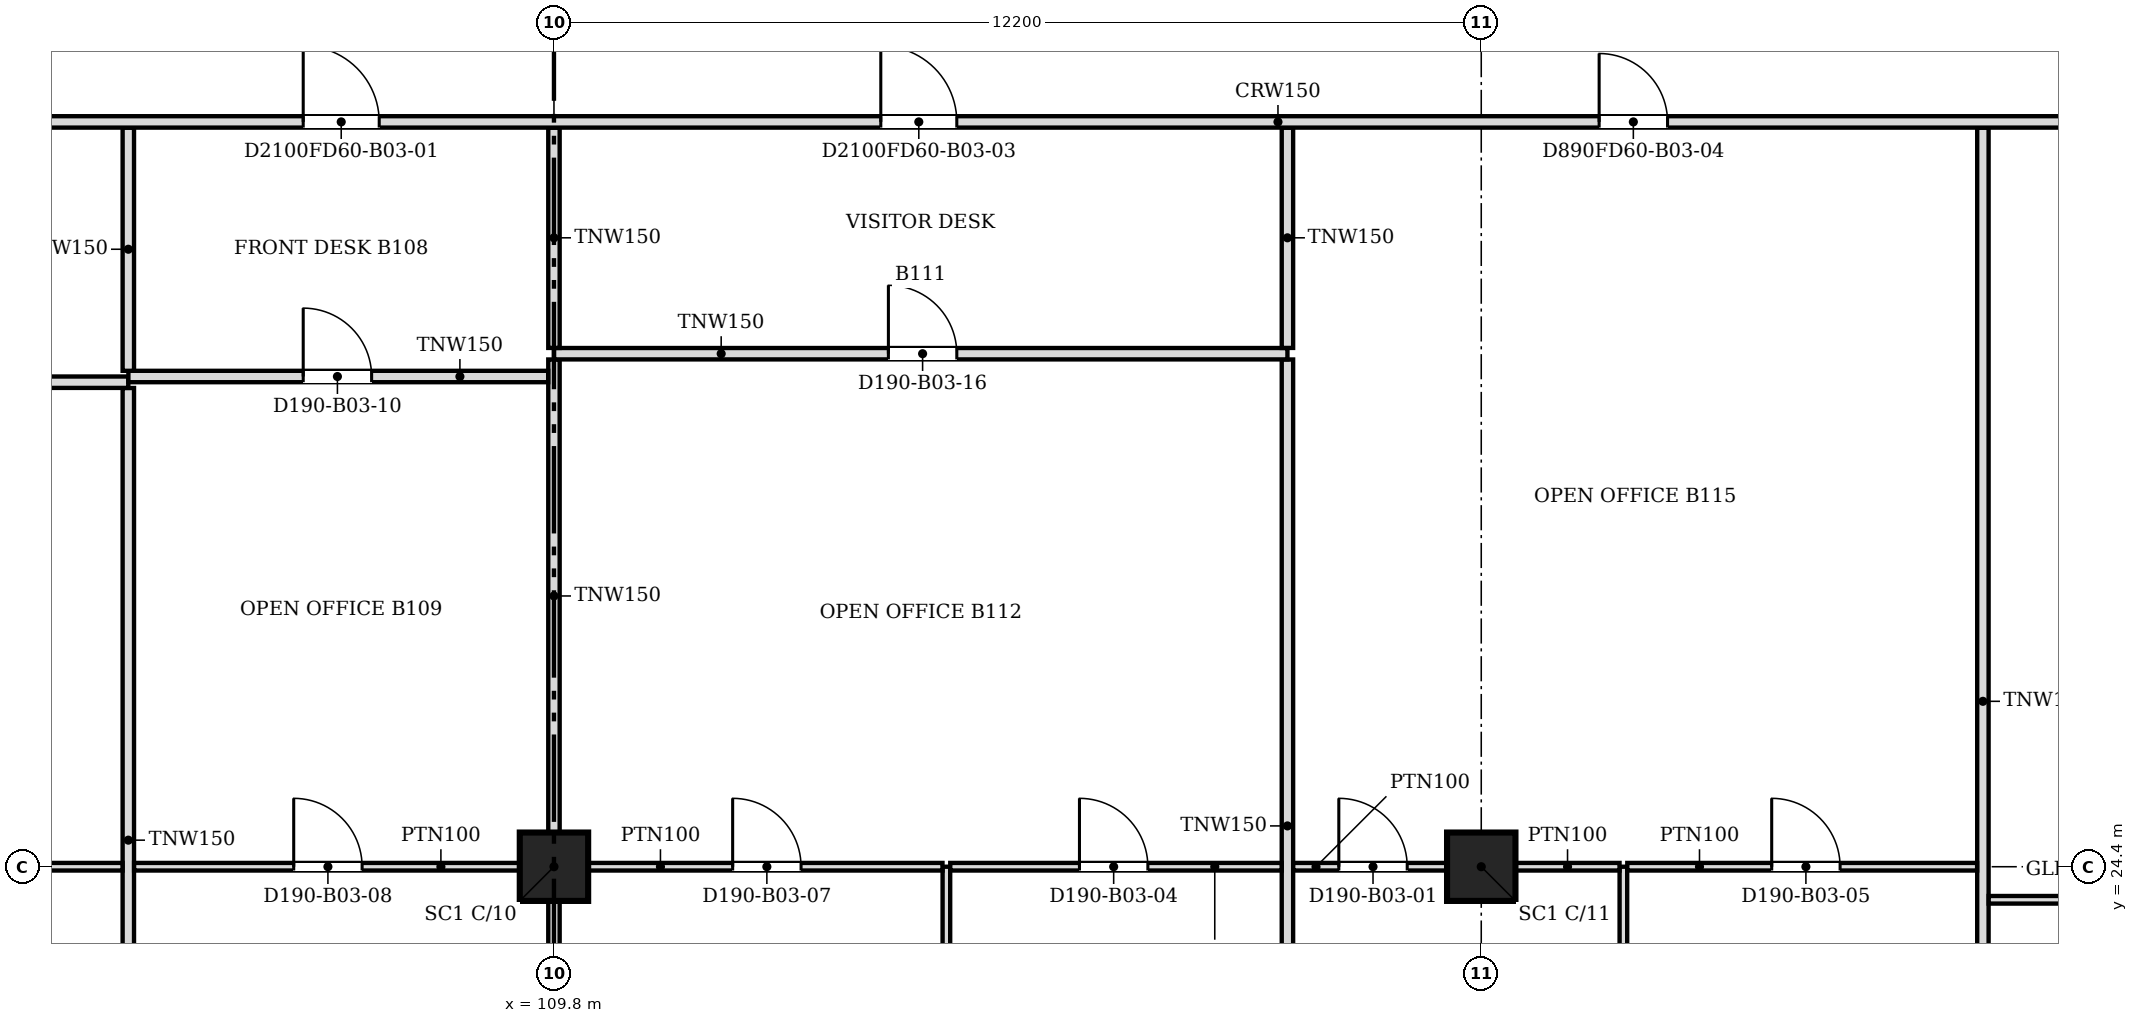
"""IFC4 building model, lengths in metres.
Left out: names, types, materials, properties, quantities, classifications, styles, units other than length and angle.
Written with IfcOpenShell. Run it as: python <this file> out.ifc"""

import sys

from ifc_helpers import new_model, si_unit, direction, frame, frame_2d, origin, origin_2d, place, context, subcontext, project, spatial, rectangle, extrude, source, transform, mapped, element, fill, save


model = new_model("IFC4")
c1 = context("Model", 3, precision=1e-05, world=origin(), true_north=direction((0.0, 1.0)))
c2 = subcontext(c1, "Body", "Model", "MODEL_VIEW")
j1 = project(units=[si_unit("LENGTHUNIT", "METRE"), si_unit("PLANEANGLEUNIT", "RADIAN")], contexts=[c1])
p1 = place(None, origin())
s1 = spatial("IfcSite", under=j1, at=p1, CompositionType="ELEMENT")
p2 = place(p1, origin())
s2 = spatial("IfcBuilding", under=s1, at=p2, CompositionType="ELEMENT")
p3 = place(p2, frame((0.0, 0.0, 25.8)))
s3 = spatial("IfcBuildingStorey", under=s2, at=p3, CompositionType="ELEMENT", Elevation=25.8)
for number, where, z_axis, x_axis in (
    (1, (109.8, 24.4, 0.0), (0.0, 0.0, 1.0), (1.0, 0.0, 0.0)),
    (2, (122.0, 24.4, 0.0), (0.0, 0.0, 1.0), (1.0, 0.0, 0.0)),
):
    element("IfcColumn", number, at=place(p3, frame(where, z_axis=z_axis, x_axis=x_axis)), inside=s3, PredefinedType="COLUMN", context=c2, shape_type="SweptSolid", body=[
        extrude(rectangle(XDim=0.9, YDim=0.9, at=origin_2d()), origin(), (0.0, 0.0, 1.0), 3.6),
    ])
p4 = place(p3, frame((104.2, 18.8, 0.0), z_axis=(0.0, 0.0, 1.0), x_axis=(0.0, 1.0, 0.0)))
e3 = element("IfcWall", 3, at=p4, inside=s3, PredefinedType="PARTITIONING", context=c2, shape_type="SweptSolid", body=[
    extrude(rectangle(XDim=11.899, YDim=0.15, at=frame_2d((5.949, 0.0))), origin(), (0.0, 0.0, 1.0), 3.067),
])
p5 = place(p3, frame((109.8, 18.8, 0.0), z_axis=(0.0, 0.0, 1.0), x_axis=(0.0, 1.0, 0.0)))
e4 = element("IfcWall", 4, at=p5, inside=s3, PredefinedType="PARTITIONING", context=c2, shape_type="SweptSolid", body=[
    extrude(rectangle(XDim=5.149, YDim=0.15, at=frame_2d((2.574, 0.0))), origin(), (0.0, 0.0, 1.0), 3.067),
])
p6 = place(p3, frame((114.963, 18.8, 0.0), z_axis=(0.0, 0.0, 1.0), x_axis=(0.0, 1.0, 0.0)))
e5 = element("IfcWall", 5, at=p6, inside=s3, PredefinedType="PARTITIONING", context=c2, shape_type="SweptSolid", body=[
    extrude(rectangle(XDim=5.6, YDim=0.1, at=frame_2d((2.8, 0.0))), origin(), (0.0, 0.0, 1.0), 3.067),
])
p7 = place(p3, frame((119.45, 18.8, 0.0), z_axis=(0.0, 0.0, 1.0), x_axis=(0.0, 1.0, 0.0)))
e6 = element("IfcWall", 6, at=p7, inside=s3, PredefinedType="PARTITIONING", context=c2, shape_type="SweptSolid", body=[
    extrude(rectangle(XDim=12.274, YDim=0.15, at=frame_2d((6.137, 0.0))), origin(), (0.0, 0.0, 1.0), 3.067),
])
p8 = place(p3, frame((123.87, 18.8, 0.0), z_axis=(0.0, 0.0, 1.0), x_axis=(0.0, 1.0, 0.0)))
e7 = element("IfcWall", 7, at=p8, inside=s3, PredefinedType="PARTITIONING", context=c2, shape_type="SweptSolid", body=[
    extrude(rectangle(XDim=5.6, YDim=0.1, at=frame_2d((2.8, 0.0))), origin(), (0.0, 0.0, 1.0), 3.067),
])
p9 = place(p3, frame((128.6, 19.029, 0.0), z_axis=(0.0, 0.0, 1.0), x_axis=(0.0, 1.0, 0.0)))
e8 = element("IfcWall", 8, at=p9, inside=s3, PredefinedType="PARTITIONING", context=c2, shape_type="SweptSolid", body=[
    extrude(rectangle(XDim=15.095, YDim=0.15, at=frame_2d((7.548, 0.0))), origin(), (0.0, 0.0, 1.0), 3.067),
])
p10 = place(p3, frame((133.496, 23.965, 0.0), z_axis=(0.0, 0.0, 1.0), x_axis=(-1.0, 0.0, 0.0)))
e9 = element("IfcWall", 9, at=p10, inside=s3, PredefinedType="PARTITIONING", context=c2, shape_type="SweptSolid", body=[
    extrude(rectangle(XDim=4.82, YDim=0.1, at=frame_2d((2.41, 0.0))), origin(), (0.0, 0.0, 1.0), 3.067),
])
m1 = source(origin(), c2, "Body", "SweptSolid", [
    extrude(rectangle(XDim=0.9, YDim=2.1, at=frame_2d((0.45, 1.05))), frame((0.0, 0.06, 0.0), z_axis=(0.0, -1.0, 0.0), x_axis=(1.0, 0.0, 0.0)), (0.0, 0.0, 1.0), 0.12),
])
p11 = place(p10, frame((1.92, 0.0, 0.0)))
e10 = element("IfcOpeningElement", 10, at=p11, cuts=e9, PredefinedType="OPENING", context=c2, shape_type="MappedRepresentation", body=[
    mapped(m1, transform((0.0, 0.0, 0.0), scale=1.0)),
])
p12 = place(p3, frame((104.124, 24.4, 0.0), z_axis=(0.0, 0.0, 1.0), x_axis=(-1.0, 0.0, 0.0)))
e11 = element("IfcWall", 11, at=p12, inside=s3, PredefinedType="PARTITIONING", context=c2, shape_type="SweptSolid", body=[
    extrude(rectangle(XDim=6.073, YDim=0.1, at=frame_2d((3.037, 0.0))), origin(), (0.0, 0.0, 1.0), 3.067),
])
p13 = place(p12, frame((2.396, 0.0, 0.0)))
e12 = element("IfcOpeningElement", 12, at=p13, cuts=e11, PredefinedType="OPENING", context=c2, shape_type="MappedRepresentation", body=[
    mapped(m1, transform((0.0, 0.0, 0.0), scale=1.0)),
])
p14 = place(p3, frame((109.349, 24.4, 0.0), z_axis=(0.0, 0.0, 1.0), x_axis=(-1.0, 0.0, 0.0)))
e13 = element("IfcWall", 13, at=p14, inside=s3, PredefinedType="PARTITIONING", context=c2, shape_type="SweptSolid", body=[
    extrude(rectangle(XDim=5.073, YDim=0.1, at=frame_2d((2.537, 0.0))), origin(), (0.0, 0.0, 1.0), 3.067),
])
p15 = place(p14, frame((2.073, 0.0, 0.0)))
e14 = element("IfcOpeningElement", 14, at=p15, cuts=e13, PredefinedType="OPENING", context=c2, shape_type="MappedRepresentation", body=[
    mapped(m1, transform((0.0, 0.0, 0.0), scale=1.0)),
])
p16 = place(p3, frame((114.912, 24.4, 0.0), z_axis=(0.0, 0.0, 1.0), x_axis=(-1.0, 0.0, 0.0)))
e15 = element("IfcWall", 15, at=p16, inside=s3, PredefinedType="PARTITIONING", context=c2, shape_type="SweptSolid", body=[
    extrude(rectangle(XDim=4.661, YDim=0.1, at=frame_2d((2.33, 0.0))), origin(), (0.0, 0.0, 1.0), 3.067),
])
p17 = place(p16, frame((1.861, 0.0, 0.0)))
e16 = element("IfcOpeningElement", 16, at=p17, cuts=e15, PredefinedType="OPENING", context=c2, shape_type="MappedRepresentation", body=[
    mapped(m1, transform((0.0, 0.0, 0.0), scale=1.0)),
])
p18 = place(p3, frame((119.374, 24.4, 0.0), z_axis=(0.0, 0.0, 1.0), x_axis=(-1.0, 0.0, 0.0)))
e17 = element("IfcWall", 17, at=p18, inside=s3, PredefinedType="PARTITIONING", context=c2, shape_type="SweptSolid", body=[
    extrude(rectangle(XDim=4.36, YDim=0.1, at=frame_2d((2.18, 0.0))), origin(), (0.0, 0.0, 1.0), 3.067),
])
p19 = place(p18, frame((1.76, 0.0, 0.0)))
e18 = element("IfcOpeningElement", 18, at=p19, cuts=e17, PredefinedType="OPENING", context=c2, shape_type="MappedRepresentation", body=[
    mapped(m1, transform((0.0, 0.0, 0.0), scale=1.0)),
])
p20 = place(p3, frame((121.549, 24.4, 0.0), z_axis=(0.0, 0.0, 1.0), x_axis=(-1.0, 0.0, 0.0)))
e19 = element("IfcWall", 19, at=p20, inside=s3, PredefinedType="PARTITIONING", context=c2, shape_type="SweptSolid", body=[
    extrude(rectangle(XDim=2.023, YDim=0.1, at=frame_2d((1.012, 0.0))), origin(), (0.0, 0.0, 1.0), 3.067),
])
p21 = place(p20, frame((0.523, 0.0, 0.0)))
e20 = element("IfcOpeningElement", 20, at=p21, cuts=e19, PredefinedType="OPENING", context=c2, shape_type="MappedRepresentation", body=[
    mapped(m1, transform((0.0, 0.0, 0.0), scale=1.0)),
])
p22 = place(p3, frame((122.451, 24.4, 0.0), z_axis=(0.0, 0.0, 1.0), x_axis=(1.0, 0.0, 0.0)))
e21 = element("IfcWall", 21, at=p22, inside=s3, PredefinedType="PARTITIONING", context=c2, shape_type="SweptSolid", body=[
    extrude(rectangle(XDim=1.368, YDim=0.1, at=frame_2d((0.684, 0.0))), origin(), (0.0, 0.0, 1.0), 3.067),
])
p23 = place(p3, frame((128.524, 24.4, 0.0), z_axis=(0.0, 0.0, 1.0), x_axis=(-1.0, 0.0, 0.0)))
e22 = element("IfcWall", 22, at=p23, inside=s3, PredefinedType="PARTITIONING", context=c2, shape_type="SweptSolid", body=[
    extrude(rectangle(XDim=4.603, YDim=0.1, at=frame_2d((2.301, 0.0))), origin(), (0.0, 0.0, 1.0), 3.067),
])
p24 = place(p23, frame((1.803, 0.0, 0.0)))
e23 = element("IfcOpeningElement", 23, at=p24, cuts=e22, PredefinedType="OPENING", context=c2, shape_type="MappedRepresentation", body=[
    mapped(m1, transform((0.0, 0.0, 0.0), scale=1.0)),
])
p25 = place(p3, frame((109.8, 24.851, 0.0), z_axis=(0.0, 0.0, 1.0), x_axis=(0.0, 1.0, 0.0)))
e24 = element("IfcWall", 24, at=p25, inside=s3, PredefinedType="PARTITIONING", context=c2, shape_type="SweptSolid", body=[
    extrude(rectangle(XDim=6.223, YDim=0.15, at=frame_2d((3.111, 0.0))), origin(), (0.0, 0.0, 1.0), 3.067),
])
p26 = place(p3, frame((104.2, 30.775, 0.0), z_axis=(0.0, 0.0, 1.0), x_axis=(-1.0, 0.0, 0.0)))
e25 = element("IfcWall", 25, at=p26, inside=s3, PredefinedType="PARTITIONING", context=c2, shape_type="SweptSolid", body=[
    extrude(rectangle(XDim=12.2, YDim=0.15, at=frame_2d((6.1, 0.0))), origin(), (0.0, 0.0, 1.0), 3.067),
])
m2 = source(origin(), c2, "Body", "SweptSolid", [
    extrude(rectangle(XDim=0.9, YDim=2.1, at=frame_2d((0.45, 1.05))), frame((0.0, 0.085, 0.0), z_axis=(0.0, -1.0, 0.0), x_axis=(1.0, 0.0, 0.0)), (0.0, 0.0, 1.0), 0.17),
])
p27 = place(p26, frame((5.7, 0.0, 0.0)))
e26 = element("IfcOpeningElement", 26, at=p27, cuts=e25, PredefinedType="OPENING", context=c2, shape_type="MappedRepresentation", body=[
    mapped(m2, transform((0.0, 0.0, 0.0), scale=1.0)),
])
p28 = place(p3, frame((109.724, 30.85, 0.0), z_axis=(0.0, 0.0, 1.0), x_axis=(-1.0, 0.0, 0.0)))
e27 = element("IfcWall", 27, at=p28, inside=s3, PredefinedType="PARTITIONING", context=c2, shape_type="SweptSolid", body=[
    extrude(rectangle(XDim=5.523, YDim=0.15, at=frame_2d((2.762, 0.0))), origin(), (0.0, 0.0, 1.0), 3.067),
])
p29 = place(p28, frame((2.323, 0.0, 0.0)))
e28 = element("IfcOpeningElement", 28, at=p29, cuts=e27, PredefinedType="OPENING", context=c2, shape_type="MappedRepresentation", body=[
    mapped(m2, transform((0.0, 0.0, 0.0), scale=1.0)),
])
p30 = place(p3, frame((104.2, 30.925, 0.0), z_axis=(0.0, 0.0, 1.0), x_axis=(0.0, 1.0, 0.0)))
e29 = element("IfcWall", 29, at=p30, inside=s3, PredefinedType="PARTITIONING", context=c2, shape_type="SweptSolid", body=[
    extrude(rectangle(XDim=3.199, YDim=0.15, at=frame_2d((1.6, 0.0))), origin(), (0.0, 0.0, 1.0), 3.067),
])
p31 = place(p3, frame((119.45, 31.15, 0.0), z_axis=(0.0, 0.0, 1.0), x_axis=(-1.0, 0.0, 0.0)))
e30 = element("IfcWall", 30, at=p31, inside=s3, PredefinedType="PARTITIONING", context=c2, shape_type="SweptSolid", body=[
    extrude(rectangle(XDim=9.65, YDim=0.15, at=frame_2d((4.825, 0.0))), origin(), (0.0, 0.0, 1.0), 3.067),
])
p32 = place(p31, frame((4.35, 0.0, 0.0)))
e31 = element("IfcOpeningElement", 31, at=p32, cuts=e30, PredefinedType="OPENING", context=c2, shape_type="MappedRepresentation", body=[
    mapped(m2, transform((0.0, 0.0, 0.0), scale=1.0)),
])
for number, where, z_axis, x_axis in (
    (32, (109.8, 31.226, 0.0), (0.0, 0.0, 1.0), (0.0, 1.0, 0.0)),
    (33, (119.45, 31.226, 0.0), (0.0, 0.0, 1.0), (0.0, 1.0, 0.0)),
):
    element("IfcWall", number, at=place(p3, frame(where, z_axis=z_axis, x_axis=x_axis)), inside=s3, PredefinedType="PARTITIONING", context=c2, shape_type="SweptSolid", body=[
        extrude(rectangle(XDim=2.898, YDim=0.15, at=frame_2d((1.449, 0.0))), origin(), (0.0, 0.0, 1.0), 3.067),
    ])
p33 = place(p3, frame((133.7, 34.2, 0.0), z_axis=(0.0, 0.0, 1.0), x_axis=(-1.0, 0.0, 0.0)))
e34 = element("IfcWall", 34, at=p33, inside=s3, PredefinedType="PARTITIONING", context=c2, shape_type="SweptSolid", body=[
    extrude(rectangle(XDim=47.8, YDim=0.15, at=frame_2d((23.9, 0.0))), origin(), (0.0, 0.0, 1.0), 3.067),
])
p34 = place(p33, frame((2.099, 0.0, 0.0)))
e35 = element("IfcOpeningElement", 35, at=p34, cuts=e34, PredefinedType="OPENING", context=c2, shape_type="MappedRepresentation", body=[
    mapped(m2, transform((0.0, 0.0, 0.0), scale=1.0)),
])
m3 = source(origin(), c2, "Body", "SweptSolid", [
    extrude(rectangle(XDim=1.0, YDim=2.1, at=frame_2d((0.5, 1.05))), frame((0.0, 0.085, 0.0), z_axis=(0.0, -1.0, 0.0), x_axis=(1.0, 0.0, 0.0)), (0.0, 0.0, 1.0), 0.17),
])
p35 = place(p33, frame((26.199, 0.0, 0.0)))
e36 = element("IfcOpeningElement", 36, at=p35, cuts=e34, PredefinedType="OPENING", context=c2, shape_type="MappedRepresentation", body=[
    mapped(m3, transform((0.0, 0.0, 0.0), scale=1.0)),
])
p36 = place(p33, frame((44.3, 0.0, 0.0)))
e37 = element("IfcOpeningElement", 37, at=p36, cuts=e34, PredefinedType="OPENING", context=c2, shape_type="MappedRepresentation", body=[
    mapped(m2, transform((0.0, 0.0, 0.0), scale=1.0)),
])
p37 = place(p33, frame((9.249, 0.0, 0.0)))
e38 = element("IfcOpeningElement", 38, at=p37, cuts=e34, PredefinedType="OPENING", context=c2, shape_type="MappedRepresentation", body=[
    mapped(m2, transform((0.0, 0.0, 0.0), scale=1.0)),
])
p38 = place(p33, frame((18.6, 0.0, 0.0)))
e39 = element("IfcOpeningElement", 39, at=p38, cuts=e34, PredefinedType="OPENING", context=c2, shape_type="MappedRepresentation", body=[
    mapped(m3, transform((0.0, 0.0, 0.0), scale=1.0)),
])
p39 = place(p33, frame((35.1, 0.0, 0.0)))
e40 = element("IfcOpeningElement", 40, at=p39, cuts=e34, PredefinedType="OPENING", context=c2, shape_type="MappedRepresentation", body=[
    mapped(m3, transform((0.0, 0.0, 0.0), scale=1.0)),
])
m4 = source(origin(), c2, "Body", "SweptSolid", [
    extrude(rectangle(XDim=0.9, YDim=2.1, at=frame_2d((0.45, 1.05))), frame((0.0, 0.025, 0.0), z_axis=(0.0, -1.0, 0.0), x_axis=(1.0, 0.0, 0.0)), (0.0, 0.0, 1.0), 0.05),
])
p40 = place(p21, origin())
e41 = element("IfcDoor", 41, at=p40, inside=s3, OperationType="SINGLE_SWING_RIGHT", PredefinedType="DOOR", context=c2, shape_type="MappedRepresentation", body=[
    mapped(m4, transform((0.0, 0.0, 0.0), scale=1.0)),
])
fill(e20, e41)
p41 = place(p19, origin())
e42 = element("IfcDoor", 42, at=p41, inside=s3, OperationType="SINGLE_SWING_RIGHT", PredefinedType="DOOR", context=c2, shape_type="MappedRepresentation", body=[
    mapped(m4, transform((0.0, 0.0, 0.0), scale=1.0)),
])
fill(e18, e42)
p42 = place(p24, origin())
e43 = element("IfcDoor", 43, at=p42, inside=s3, OperationType="SINGLE_SWING_RIGHT", PredefinedType="DOOR", context=c2, shape_type="MappedRepresentation", body=[
    mapped(m4, transform((0.0, 0.0, 0.0), scale=1.0)),
])
fill(e23, e43)
p43 = place(p17, origin())
e44 = element("IfcDoor", 44, at=p43, inside=s3, OperationType="SINGLE_SWING_RIGHT", PredefinedType="DOOR", context=c2, shape_type="MappedRepresentation", body=[
    mapped(m4, transform((0.0, 0.0, 0.0), scale=1.0)),
])
fill(e16, e44)
p44 = place(p15, origin())
e45 = element("IfcDoor", 45, at=p44, inside=s3, OperationType="SINGLE_SWING_RIGHT", PredefinedType="DOOR", context=c2, shape_type="MappedRepresentation", body=[
    mapped(m4, transform((0.0, 0.0, 0.0), scale=1.0)),
])
fill(e14, e45)
p45 = place(p29, origin())
e46 = element("IfcDoor", 46, at=p45, inside=s3, OperationType="SINGLE_SWING_RIGHT", PredefinedType="DOOR", context=c2, shape_type="MappedRepresentation", body=[
    mapped(m4, transform((0.0, 0.0, 0.0), scale=1.0)),
])
fill(e28, e46)
m5 = source(origin(), c2, "Body", "SweptSolid", [
    extrude(rectangle(XDim=1.0, YDim=2.1, at=frame_2d((0.5, 1.05))), frame((0.0, 0.025, 0.0), z_axis=(0.0, -1.0, 0.0), x_axis=(1.0, 0.0, 0.0)), (0.0, 0.0, 1.0), 0.05),
])
p46 = place(p35, origin())
e47 = element("IfcDoor", 47, at=p46, inside=s3, OperationType="SINGLE_SWING_RIGHT", PredefinedType="DOOR", context=c2, shape_type="MappedRepresentation", body=[
    mapped(m5, transform((0.0, 0.0, 0.0), scale=1.0)),
])
fill(e36, e47)
p47 = place(p37, origin())
e48 = element("IfcDoor", 48, at=p47, inside=s3, OperationType="SINGLE_SWING_RIGHT", PredefinedType="DOOR", context=c2, shape_type="MappedRepresentation", body=[
    mapped(m4, transform((0.0, 0.0, 0.0), scale=1.0)),
])
fill(e38, e48)
p48 = place(p38, origin())
e49 = element("IfcDoor", 49, at=p48, inside=s3, OperationType="SINGLE_SWING_RIGHT", PredefinedType="DOOR", context=c2, shape_type="MappedRepresentation", body=[
    mapped(m5, transform((0.0, 0.0, 0.0), scale=1.0)),
])
fill(e39, e49)
p49 = place(p32, origin())
e50 = element("IfcDoor", 50, at=p49, inside=s3, OperationType="SINGLE_SWING_RIGHT", PredefinedType="DOOR", context=c2, shape_type="MappedRepresentation", body=[
    mapped(m4, transform((0.0, 0.0, 0.0), scale=1.0)),
])
fill(e31, e50)
save(model, sys.argv[1])
